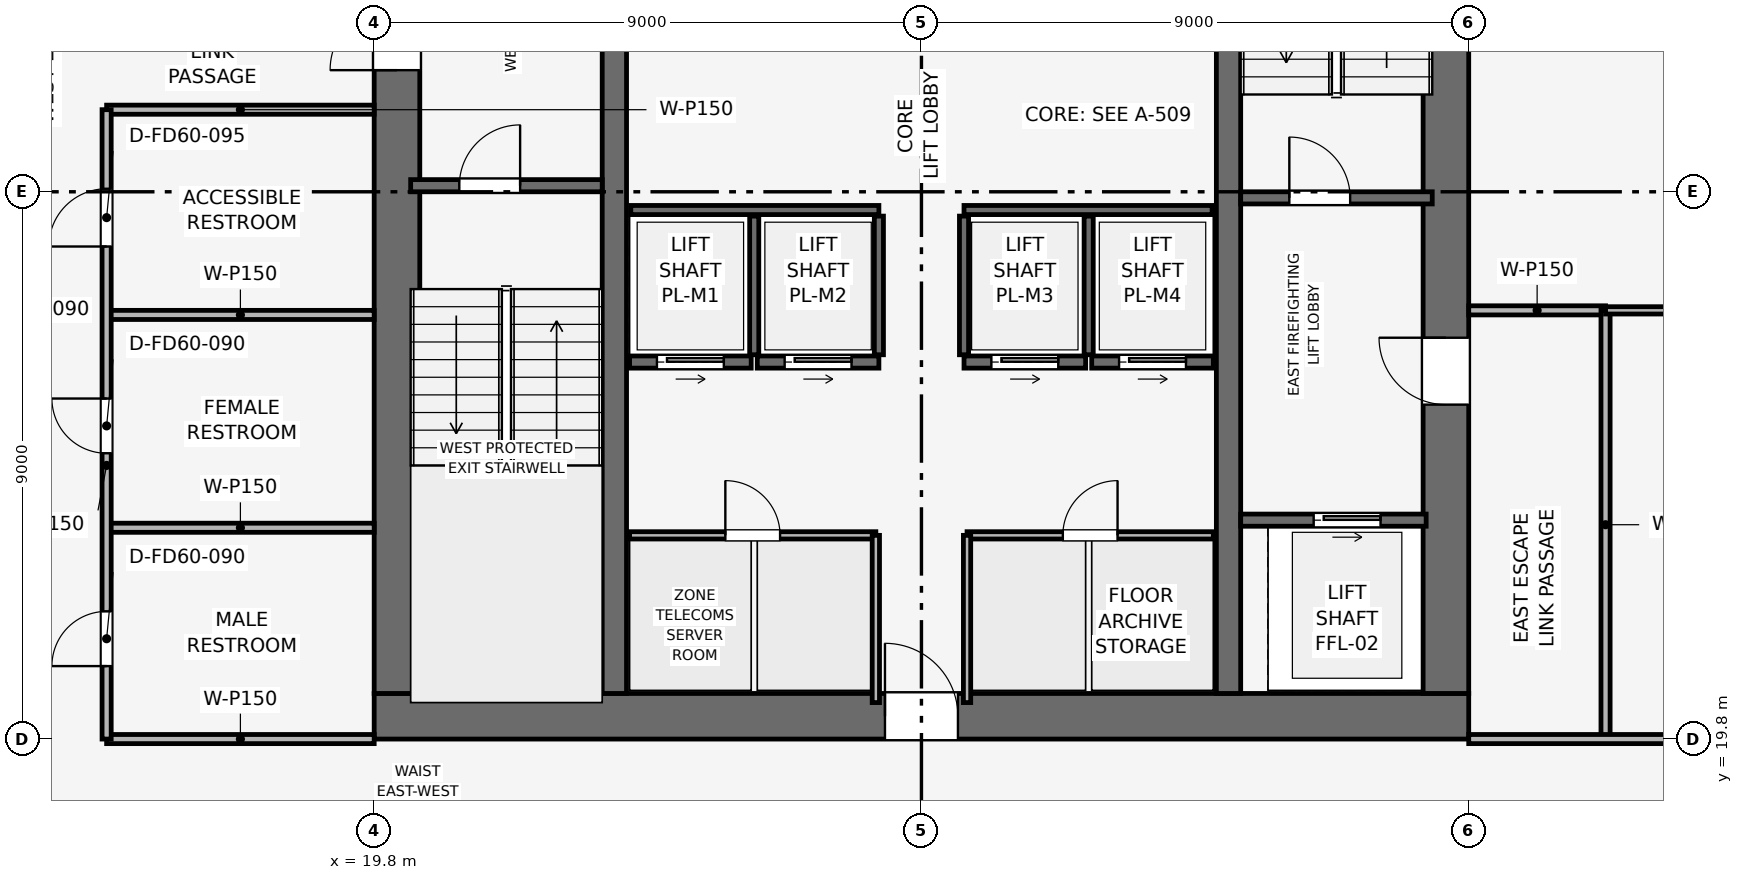
"""IFC4 building model, lengths in metres.
Left out: names, types, materials, properties, quantities, classifications, styles, units other than length and angle.
Written with IfcOpenShell. Run it as: python <this file> out.ifc"""

import sys

from ifc_helpers import new_model, si_unit, direction, frame, frame_2d, origin, place, context, subcontext, project, spatial, rectangle, extrude, element, fill, save


model = new_model("IFC4")
c1 = context("Model", 3, precision=1e-05, world=origin(), true_north=direction((0.0, 1.0)))
c2 = subcontext(c1, "Body", "Model", "MODEL_VIEW")
j1 = project(units=[si_unit("LENGTHUNIT", "METRE"), si_unit("PLANEANGLEUNIT", "RADIAN")], contexts=[c1])
p1 = place(None, origin())
s1 = spatial("IfcSite", under=j1, at=p1, CompositionType="ELEMENT")
p2 = place(p1, origin())
s2 = spatial("IfcBuilding", under=s1, at=p2, CompositionType="ELEMENT")
p3 = place(p2, frame((0.0, 0.0, 222.45)))
s3 = spatial("IfcBuildingStorey", under=s2, at=p3, CompositionType="ELEMENT", Elevation=222.45)
p4 = place(p3, frame((19.8, 20.175, 0.0), z_axis=(0.0, 0.0, 1.0), x_axis=(1.0, 0.0, 0.0)))
e1 = element("IfcWall", 1, at=p4, inside=s3, PredefinedType="SHEAR", context=c2, shape_type="SweptSolid", body=[
    extrude(rectangle(XDim=18.0, YDim=0.75, at=frame_2d((9.0, 0.0))), origin(), (0.0, 0.0, 1.0), 3.75),
])
p5 = place(p4, frame((8.4, 0.0, 0.0)))
e2 = element("IfcOpeningElement", 2, at=p5, cuts=e1, PredefinedType="OPENING", context=c2, shape_type="SweptSolid", body=[
    extrude(rectangle(XDim=1.2, YDim=2.2, at=frame_2d((0.6, 1.1))), frame((0.0, 0.385, 0.0), z_axis=(0.0, -1.0, 0.0), x_axis=(1.0, 0.0, 0.0)), (0.0, 0.0, 1.0), 0.77),
])
p6 = place(p3, frame((20.175, 20.55, 0.0), z_axis=(0.0, 0.0, 1.0), x_axis=(0.0, 1.0, 0.0)))
e3 = element("IfcWall", 3, at=p6, inside=s3, PredefinedType="SHEAR", context=c2, shape_type="SweptSolid", body=[
    extrude(rectangle(XDim=16.5, YDim=0.75, at=frame_2d((8.25, 0.0))), origin(), (0.0, 0.0, 1.0), 3.75),
])
p7 = place(p6, frame((10.25, 0.0, 0.0)))
e4 = element("IfcOpeningElement", 4, at=p7, cuts=e3, PredefinedType="OPENING", context=c2, shape_type="SweptSolid", body=[
    extrude(rectangle(XDim=1.1, YDim=2.15, at=frame_2d((0.55, 1.075))), frame((0.0, 0.385, 0.0), z_axis=(0.0, -1.0, 0.0), x_axis=(1.0, 0.0, 0.0)), (0.0, 0.0, 1.0), 0.77),
])
p8 = place(p3, frame((37.425, 20.55, 0.0), z_axis=(0.0, 0.0, 1.0), x_axis=(0.0, 1.0, 0.0)))
e5 = element("IfcWall", 5, at=p8, inside=s3, PredefinedType="SHEAR", context=c2, shape_type="SweptSolid", body=[
    extrude(rectangle(XDim=16.5, YDim=0.75, at=frame_2d((8.25, 0.0))), origin(), (0.0, 0.0, 1.0), 3.75),
])
p9 = place(p8, frame((4.75, 0.0, 0.0)))
e6 = element("IfcOpeningElement", 6, at=p9, cuts=e5, PredefinedType="OPENING", context=c2, shape_type="SweptSolid", body=[
    extrude(rectangle(XDim=1.1, YDim=2.15, at=frame_2d((0.55, 1.075))), frame((0.0, 0.385, 0.0), z_axis=(0.0, -1.0, 0.0), x_axis=(1.0, 0.0, 0.0)), (0.0, 0.0, 1.0), 0.77),
])
for number, where, z_axis, x_axis in (
    (7, (23.75, 20.55, 0.0), (0.0, 0.0, 1.0), (0.0, 1.0, 0.0)),
    (8, (33.85, 20.55, 0.0), (0.0, 0.0, 1.0), (0.0, 1.0, 0.0)),
):
    element("IfcWall", number, at=place(p3, frame(where, z_axis=z_axis, x_axis=x_axis)), inside=s3, PredefinedType="SHEAR", context=c2, shape_type="SweptSolid", body=[
        extrude(rectangle(XDim=16.5, YDim=0.4, at=frame_2d((8.25, 0.0))), origin(), (0.0, 0.0, 1.0), 3.75),
    ])
p10 = place(p3, frame((20.4, 28.9, 0.0), z_axis=(0.0, 0.0, 1.0), x_axis=(1.0, 0.0, 0.0)))
e9 = element("IfcWall", 9, at=p10, inside=s3, PredefinedType="SHEAR", context=c2, shape_type="SweptSolid", body=[
    extrude(rectangle(XDim=3.15, YDim=0.2, at=frame_2d((1.575, 0.0))), origin(), (0.0, 0.0, 1.0), 3.5),
])
p11 = place(p10, frame((0.8, 0.0, 0.0)))
e10 = element("IfcOpeningElement", 10, at=p11, cuts=e9, PredefinedType="OPENING", context=c2, shape_type="SweptSolid", body=[
    extrude(rectangle(XDim=1.0, YDim=2.1, at=frame_2d((0.5, 1.05))), frame((0.0, 0.11, 0.0), z_axis=(0.0, -1.0, 0.0), x_axis=(1.0, 0.0, 0.0)), (0.0, 0.0, 1.0), 0.22),
])
p12 = place(p3, frame((34.05, 28.7, 0.0), z_axis=(0.0, 0.0, 1.0), x_axis=(1.0, 0.0, 0.0)))
e11 = element("IfcWall", 11, at=p12, inside=s3, PredefinedType="SHEAR", context=c2, shape_type="SweptSolid", body=[
    extrude(rectangle(XDim=3.15, YDim=0.2, at=frame_2d((1.575, 0.0))), origin(), (0.0, 0.0, 1.0), 3.5),
])
p13 = place(p12, frame((0.8, 0.0, 0.0)))
e12 = element("IfcOpeningElement", 12, at=p13, cuts=e11, PredefinedType="OPENING", context=c2, shape_type="SweptSolid", body=[
    extrude(rectangle(XDim=1.0, YDim=2.1, at=frame_2d((0.5, 1.05))), frame((0.0, 0.11, 0.0), z_axis=(0.0, -1.0, 0.0), x_axis=(1.0, 0.0, 0.0)), (0.0, 0.0, 1.0), 0.22),
])
p14 = place(p3, frame((34.05, 23.4, 0.0), z_axis=(0.0, 0.0, 1.0), x_axis=(1.0, 0.0, 0.0)))
e13 = element("IfcWall", 13, at=p14, inside=s3, PredefinedType="SHEAR", context=c2, shape_type="SweptSolid", body=[
    extrude(rectangle(XDim=3.05, YDim=0.2, at=frame_2d((1.525, 0.0))), origin(), (0.0, 0.0, 1.0), 3.5),
])
p15 = place(p14, frame((1.2, 0.0, 0.0)))
e14 = element("IfcOpeningElement", 14, at=p15, cuts=e13, PredefinedType="OPENING", context=c2, shape_type="SweptSolid", body=[
    extrude(rectangle(XDim=1.1, YDim=2.15, at=frame_2d((0.55, 1.075))), frame((0.0, 0.11, 0.0), z_axis=(0.0, -1.0, 0.0), x_axis=(1.0, 0.0, 0.0)), (0.0, 0.0, 1.0), 0.22),
])
p16 = place(p3, frame((24.0, 26.0, 0.0), z_axis=(0.0, 0.0, 1.0), x_axis=(1.0, 0.0, 0.0)))
e15 = element("IfcWall", 15, at=p16, inside=s3, PredefinedType="SHEAR", context=c2, shape_type="SweptSolid", body=[
    extrude(rectangle(XDim=2.0, YDim=0.2, at=frame_2d((1.0, 0.0))), origin(), (0.0, 0.0, 1.0), 3.5),
])
p17 = place(p16, frame((0.45, 0.0, 0.0)))
e16 = element("IfcOpeningElement", 16, at=p17, cuts=e15, PredefinedType="OPENING", context=c2, shape_type="SweptSolid", body=[
    extrude(rectangle(XDim=1.1, YDim=2.15, at=frame_2d((0.55, 1.075))), frame((0.0, 0.11, 0.0), z_axis=(0.0, -1.0, 0.0), x_axis=(1.0, 0.0, 0.0)), (0.0, 0.0, 1.0), 0.22),
])
p18 = place(p3, frame((26.1, 26.0, 0.0), z_axis=(0.0, 0.0, 1.0), x_axis=(1.0, 0.0, 0.0)))
e17 = element("IfcWall", 17, at=p18, inside=s3, PredefinedType="SHEAR", context=c2, shape_type="SweptSolid", body=[
    extrude(rectangle(XDim=2.0, YDim=0.2, at=frame_2d((1.0, 0.0))), origin(), (0.0, 0.0, 1.0), 3.5),
])
p19 = place(p18, frame((0.45, 0.0, 0.0)))
e18 = element("IfcOpeningElement", 18, at=p19, cuts=e17, PredefinedType="OPENING", context=c2, shape_type="SweptSolid", body=[
    extrude(rectangle(XDim=1.1, YDim=2.15, at=frame_2d((0.55, 1.075))), frame((0.0, 0.11, 0.0), z_axis=(0.0, -1.0, 0.0), x_axis=(1.0, 0.0, 0.0)), (0.0, 0.0, 1.0), 0.22),
])
p20 = place(p3, frame((29.5, 26.0, 0.0), z_axis=(0.0, 0.0, 1.0), x_axis=(1.0, 0.0, 0.0)))
e19 = element("IfcWall", 19, at=p20, inside=s3, PredefinedType="SHEAR", context=c2, shape_type="SweptSolid", body=[
    extrude(rectangle(XDim=2.0, YDim=0.2, at=frame_2d((1.0, 0.0))), origin(), (0.0, 0.0, 1.0), 3.5),
])
p21 = place(p20, frame((0.45, 0.0, 0.0)))
e20 = element("IfcOpeningElement", 20, at=p21, cuts=e19, PredefinedType="OPENING", context=c2, shape_type="SweptSolid", body=[
    extrude(rectangle(XDim=1.1, YDim=2.15, at=frame_2d((0.55, 1.075))), frame((0.0, 0.11, 0.0), z_axis=(0.0, -1.0, 0.0), x_axis=(1.0, 0.0, 0.0)), (0.0, 0.0, 1.0), 0.22),
])
p22 = place(p3, frame((31.6, 26.0, 0.0), z_axis=(0.0, 0.0, 1.0), x_axis=(1.0, 0.0, 0.0)))
e21 = element("IfcWall", 21, at=p22, inside=s3, PredefinedType="SHEAR", context=c2, shape_type="SweptSolid", body=[
    extrude(rectangle(XDim=2.0, YDim=0.2, at=frame_2d((1.0, 0.0))), origin(), (0.0, 0.0, 1.0), 3.5),
])
p23 = place(p22, frame((0.45, 0.0, 0.0)))
e22 = element("IfcOpeningElement", 22, at=p23, cuts=e21, PredefinedType="OPENING", context=c2, shape_type="SweptSolid", body=[
    extrude(rectangle(XDim=1.1, YDim=2.15, at=frame_2d((0.55, 1.075))), frame((0.0, 0.11, 0.0), z_axis=(0.0, -1.0, 0.0), x_axis=(1.0, 0.0, 0.0)), (0.0, 0.0, 1.0), 0.22),
])
for number, where, z_axis, x_axis in (
    (23, (24.02, 28.5, 0.0), (0.0, 0.0, 1.0), (1.0, 0.0, 0.0)),
    (24, (29.5, 28.5, 0.0), (0.0, 0.0, 1.0), (1.0, 0.0, 0.0)),
):
    element("IfcWall", number, at=place(p3, frame(where, z_axis=z_axis, x_axis=x_axis)), inside=s3, PredefinedType="SHEAR", context=c2, shape_type="SweptSolid", body=[
        extrude(rectangle(XDim=4.08, YDim=0.15, at=frame_2d((2.04, 0.0))), origin(), (0.0, 0.0, 1.0), 3.5),
    ])
for number, where, z_axis, x_axis in (
    (25, (26.05, 26.12, 0.0), (0.0, 0.0, 1.0), (0.0, 1.0, 0.0)),
    (26, (28.1, 26.12, 0.0), (0.0, 0.0, 1.0), (0.0, 1.0, 0.0)),
    (27, (29.5, 26.12, 0.0), (0.0, 0.0, 1.0), (0.0, 1.0, 0.0)),
    (28, (31.55, 26.12, 0.0), (0.0, 0.0, 1.0), (0.0, 1.0, 0.0)),
):
    element("IfcWall", number, at=place(p3, frame(where, z_axis=z_axis, x_axis=x_axis)), inside=s3, PredefinedType="SHEAR", context=c2, shape_type="SweptSolid", body=[
        extrude(rectangle(XDim=2.28, YDim=0.15, at=frame_2d((1.14, 0.0))), origin(), (0.0, 0.0, 1.0), 3.5),
    ])
p24 = place(p3, frame((24.0, 23.15, 0.0), z_axis=(0.0, 0.0, 1.0), x_axis=(1.0, 0.0, 0.0)))
e29 = element("IfcWall", 29, at=p24, inside=s3, PredefinedType="PARTITIONING", context=c2, shape_type="SweptSolid", body=[
    extrude(rectangle(XDim=4.05, YDim=0.12, at=frame_2d((2.025, 0.0))), origin(), (0.0, 0.0, 1.0), 3.5),
])
p25 = place(p24, frame((1.575, 0.0, 0.0)))
e30 = element("IfcOpeningElement", 30, at=p25, cuts=e29, PredefinedType="OPENING", context=c2, shape_type="SweptSolid", body=[
    extrude(rectangle(XDim=0.9, YDim=2.1, at=frame_2d((0.45, 1.05))), frame((0.0, 0.07, 0.0), z_axis=(0.0, -1.0, 0.0), x_axis=(1.0, 0.0, 0.0)), (0.0, 0.0, 1.0), 0.14),
])
p26 = place(p3, frame((28.05, 20.4, 0.0), z_axis=(0.0, 0.0, 1.0), x_axis=(0.0, 1.0, 0.0)))
e31 = element("IfcWall", 31, at=p26, inside=s3, PredefinedType="PARTITIONING", context=c2, shape_type="SweptSolid", body=[
    extrude(rectangle(XDim=2.75, YDim=0.12, at=frame_2d((1.375, 0.0))), origin(), (0.0, 0.0, 1.0), 3.5),
])
p27 = place(p3, frame((29.55, 23.15, 0.0), z_axis=(0.0, 0.0, 1.0), x_axis=(1.0, 0.0, 0.0)))
e32 = element("IfcWall", 32, at=p27, inside=s3, PredefinedType="PARTITIONING", context=c2, shape_type="SweptSolid", body=[
    extrude(rectangle(XDim=4.05, YDim=0.12, at=frame_2d((2.025, 0.0))), origin(), (0.0, 0.0, 1.0), 3.5),
])
p28 = place(p27, frame((1.575, 0.0, 0.0)))
e33 = element("IfcOpeningElement", 33, at=p28, cuts=e32, PredefinedType="OPENING", context=c2, shape_type="SweptSolid", body=[
    extrude(rectangle(XDim=0.9, YDim=2.1, at=frame_2d((0.45, 1.05))), frame((0.0, 0.07, 0.0), z_axis=(0.0, -1.0, 0.0), x_axis=(1.0, 0.0, 0.0)), (0.0, 0.0, 1.0), 0.14),
])
p29 = place(p3, frame((29.55, 20.4, 0.0), z_axis=(0.0, 0.0, 1.0), x_axis=(0.0, 1.0, 0.0)))
e34 = element("IfcWall", 34, at=p29, inside=s3, PredefinedType="PARTITIONING", context=c2, shape_type="SweptSolid", body=[
    extrude(rectangle(XDim=2.75, YDim=0.12, at=frame_2d((1.375, 0.0))), origin(), (0.0, 0.0, 1.0), 3.5),
])
p30 = place(p3, frame((15.4, 19.8, 0.0), z_axis=(0.0, 0.0, 1.0), x_axis=(1.0, 0.0, 0.0)))
e35 = element("IfcWall", 35, at=p30, inside=s3, PredefinedType="PARTITIONING", context=c2, shape_type="SweptSolid", body=[
    extrude(rectangle(XDim=4.4, YDim=0.15, at=frame_2d((2.2, 0.0))), origin(), (0.0, 0.0, 1.0), 3.035),
])
for number, where, z_axis, x_axis in (
    (36, (15.4, 23.275, 0.0), (0.0, 0.0, 1.0), (1.0, 0.0, 0.0)),
    (37, (15.4, 26.775, 0.0), (0.0, 0.0, 1.0), (1.0, 0.0, 0.0)),
    (38, (15.4, 30.15, 0.0), (0.0, 0.0, 1.0), (1.0, 0.0, 0.0)),
):
    element("IfcWall", number, at=place(p3, frame(where, z_axis=z_axis, x_axis=x_axis)), inside=s3, PredefinedType="PARTITIONING", context=c2, shape_type="SweptSolid", body=[
        extrude(rectangle(XDim=4.4, YDim=0.15, at=frame_2d((2.2, 0.0))), origin(), (0.0, 0.0, 1.0), 3.5),
    ])
p31 = place(p3, frame((15.4, 19.8, 0.0), z_axis=(0.0, 0.0, 1.0), x_axis=(0.0, 1.0, 0.0)))
e39 = element("IfcWall", 39, at=p31, inside=s3, PredefinedType="PARTITIONING", context=c2, shape_type="SweptSolid", body=[
    extrude(rectangle(XDim=10.35, YDim=0.15, at=frame_2d((5.175, 0.0))), origin(), (0.0, 0.0, 1.0), 3.035),
])
p32 = place(p31, frame((1.2, 0.0, 0.0)))
e40 = element("IfcOpeningElement", 40, at=p32, cuts=e39, PredefinedType="OPENING", context=c2, shape_type="SweptSolid", body=[
    extrude(rectangle(XDim=0.9, YDim=2.1, at=frame_2d((0.45, 1.05))), frame((0.0, 0.085, 0.0), z_axis=(0.0, -1.0, 0.0), x_axis=(1.0, 0.0, 0.0)), (0.0, 0.0, 1.0), 0.17),
])
p33 = place(p31, frame((4.7, 0.0, 0.0)))
e41 = element("IfcOpeningElement", 41, at=p33, cuts=e39, PredefinedType="OPENING", context=c2, shape_type="SweptSolid", body=[
    extrude(rectangle(XDim=0.9, YDim=2.1, at=frame_2d((0.45, 1.05))), frame((0.0, 0.085, 0.0), z_axis=(0.0, -1.0, 0.0), x_axis=(1.0, 0.0, 0.0)), (0.0, 0.0, 1.0), 0.17),
])
p34 = place(p31, frame((8.1, 0.0, 0.0)))
e42 = element("IfcOpeningElement", 42, at=p34, cuts=e39, PredefinedType="OPENING", context=c2, shape_type="SweptSolid", body=[
    extrude(rectangle(XDim=0.95, YDim=2.1, at=frame_2d((0.475, 1.05))), frame((0.0, 0.085, 0.0), z_axis=(0.0, -1.0, 0.0), x_axis=(1.0, 0.0, 0.0)), (0.0, 0.0, 1.0), 0.17),
])
p35 = place(p3, frame((37.8, 26.85, 0.0), z_axis=(0.0, 0.0, 1.0), x_axis=(1.0, 0.0, 0.0)))
e43 = element("IfcWall", 43, at=p35, inside=s3, PredefinedType="PARTITIONING", context=c2, shape_type="SweptSolid", body=[
    extrude(rectangle(XDim=2.25, YDim=0.15, at=frame_2d((1.125, 0.0))), origin(), (0.0, 0.0, 1.0), 3.5),
])
p36 = place(p3, frame((40.05, 19.8, 0.0), z_axis=(0.0, 0.0, 1.0), x_axis=(0.0, 1.0, 0.0)))
e44 = element("IfcWall", 44, at=p36, inside=s3, PredefinedType="PARTITIONING", context=c2, shape_type="SweptSolid", body=[
    extrude(rectangle(XDim=7.05, YDim=0.15, at=frame_2d((3.525, 0.0))), origin(), (0.0, 0.0, 1.0), 3.035),
])
p37 = place(p3, frame((40.05, 26.85, 0.0), z_axis=(0.0, 0.0, 1.0), x_axis=(1.0, 0.0, 0.0)))
e45 = element("IfcWall", 45, at=p37, inside=s3, PredefinedType="PARTITIONING", context=c2, shape_type="SweptSolid", body=[
    extrude(rectangle(XDim=15.62, YDim=0.12, at=frame_2d((7.81, 0.0))), origin(), (0.0, 0.0, 1.0), 2.885),
])
p38 = place(p37, frame((7.36, 0.0, 0.0)))
e46 = element("IfcOpeningElement", 46, at=p38, cuts=e45, PredefinedType="OPENING", context=c2, shape_type="SweptSolid", body=[
    extrude(rectangle(XDim=0.9, YDim=2.1, at=frame_2d((0.45, 1.05))), frame((0.0, 0.07, 0.0), z_axis=(0.0, -1.0, 0.0), x_axis=(1.0, 0.0, 0.0)), (0.0, 0.0, 1.0), 0.14),
])
p39 = place(p3, frame((37.8, 19.8, 0.0), z_axis=(0.0, 0.0, 1.0), x_axis=(1.0, 0.0, 0.0)))
e47 = element("IfcWall", 47, at=p39, inside=s3, PredefinedType="PARTITIONING", context=c2, shape_type="SweptSolid", body=[
    extrude(rectangle(XDim=17.87, YDim=0.15, at=frame_2d((8.935, 0.0))), origin(), (0.0, 0.0, 1.0), 2.885),
])
p40 = place(p39, frame((4.4, 0.0, 0.0)))
e48 = element("IfcOpeningElement", 48, at=p40, cuts=e47, PredefinedType="OPENING", context=c2, shape_type="SweptSolid", body=[
    extrude(rectangle(XDim=0.9, YDim=2.1, at=frame_2d((0.45, 1.05))), frame((0.0, 0.085, 0.0), z_axis=(0.0, -1.0, 0.0), x_axis=(1.0, 0.0, 0.0)), (0.0, 0.0, 1.0), 0.17),
])
p41 = place(p11, origin())
e49 = element("IfcDoor", 49, at=p41, inside=s3, OperationType="SINGLE_SWING_RIGHT", PredefinedType="DOOR", context=c2, shape_type="SweptSolid", body=[
    extrude(rectangle(XDim=1.0, YDim=2.1, at=frame_2d((0.5, 1.05))), frame((0.0, 0.025, 0.0), z_axis=(0.0, -1.0, 0.0), x_axis=(1.0, 0.0, 0.0)), (0.0, 0.0, 1.0), 0.05),
])
fill(e10, e49)
p42 = place(p13, origin())
e50 = element("IfcDoor", 50, at=p42, inside=s3, OperationType="SINGLE_SWING_LEFT", PredefinedType="DOOR", context=c2, shape_type="SweptSolid", body=[
    extrude(rectangle(XDim=1.0, YDim=2.1, at=frame_2d((0.5, 1.05))), frame((0.0, 0.025, 0.0), z_axis=(0.0, -1.0, 0.0), x_axis=(1.0, 0.0, 0.0)), (0.0, 0.0, 1.0), 0.05),
])
fill(e12, e50)
p43 = place(p15, origin())
e51 = element("IfcDoor", 51, at=p43, inside=s3, OperationType="SLIDING_TO_RIGHT", PredefinedType="DOOR", context=c2, shape_type="SweptSolid", body=[
    extrude(rectangle(XDim=1.1, YDim=2.15, at=frame_2d((0.55, 1.075))), frame((0.0, 0.025, 0.0), z_axis=(0.0, -1.0, 0.0), x_axis=(1.0, 0.0, 0.0)), (0.0, 0.0, 1.0), 0.05),
])
fill(e14, e51)
p44 = place(p17, origin())
e52 = element("IfcDoor", 52, at=p44, inside=s3, OperationType="SLIDING_TO_RIGHT", PredefinedType="DOOR", context=c2, shape_type="SweptSolid", body=[
    extrude(rectangle(XDim=1.1, YDim=2.15, at=frame_2d((0.55, 1.075))), frame((0.0, 0.025, 0.0), z_axis=(0.0, -1.0, 0.0), x_axis=(1.0, 0.0, 0.0)), (0.0, 0.0, 1.0), 0.05),
])
fill(e16, e52)
p45 = place(p19, origin())
e53 = element("IfcDoor", 53, at=p45, inside=s3, OperationType="SLIDING_TO_RIGHT", PredefinedType="DOOR", context=c2, shape_type="SweptSolid", body=[
    extrude(rectangle(XDim=1.1, YDim=2.15, at=frame_2d((0.55, 1.075))), frame((0.0, 0.025, 0.0), z_axis=(0.0, -1.0, 0.0), x_axis=(1.0, 0.0, 0.0)), (0.0, 0.0, 1.0), 0.05),
])
fill(e18, e53)
p46 = place(p21, origin())
e54 = element("IfcDoor", 54, at=p46, inside=s3, OperationType="SLIDING_TO_RIGHT", PredefinedType="DOOR", context=c2, shape_type="SweptSolid", body=[
    extrude(rectangle(XDim=1.1, YDim=2.15, at=frame_2d((0.55, 1.075))), frame((0.0, 0.025, 0.0), z_axis=(0.0, -1.0, 0.0), x_axis=(1.0, 0.0, 0.0)), (0.0, 0.0, 1.0), 0.05),
])
fill(e20, e54)
p47 = place(p23, origin())
e55 = element("IfcDoor", 55, at=p47, inside=s3, OperationType="SLIDING_TO_RIGHT", PredefinedType="DOOR", context=c2, shape_type="SweptSolid", body=[
    extrude(rectangle(XDim=1.1, YDim=2.15, at=frame_2d((0.55, 1.075))), frame((0.0, 0.025, 0.0), z_axis=(0.0, -1.0, 0.0), x_axis=(1.0, 0.0, 0.0)), (0.0, 0.0, 1.0), 0.05),
])
fill(e22, e55)
p48 = place(p25, origin())
e56 = element("IfcDoor", 56, at=p48, inside=s3, OperationType="SINGLE_SWING_LEFT", PredefinedType="DOOR", context=c2, shape_type="SweptSolid", body=[
    extrude(rectangle(XDim=0.9, YDim=2.1, at=frame_2d((0.45, 1.05))), frame((0.0, 0.025, 0.0), z_axis=(0.0, -1.0, 0.0), x_axis=(1.0, 0.0, 0.0)), (0.0, 0.0, 1.0), 0.05),
])
fill(e30, e56)
p49 = place(p28, origin())
e57 = element("IfcDoor", 57, at=p49, inside=s3, OperationType="SINGLE_SWING_RIGHT", PredefinedType="DOOR", context=c2, shape_type="SweptSolid", body=[
    extrude(rectangle(XDim=0.9, YDim=2.1, at=frame_2d((0.45, 1.05))), frame((0.0, 0.025, 0.0), z_axis=(0.0, -1.0, 0.0), x_axis=(1.0, 0.0, 0.0)), (0.0, 0.0, 1.0), 0.05),
])
fill(e33, e57)
p50 = place(p32, origin())
e58 = element("IfcDoor", 58, at=p50, inside=s3, OperationType="SINGLE_SWING_LEFT", PredefinedType="DOOR", context=c2, shape_type="SweptSolid", body=[
    extrude(rectangle(XDim=0.9, YDim=2.1, at=frame_2d((0.45, 1.05))), frame((0.0, 0.025, 0.0), z_axis=(0.0, -1.0, 0.0), x_axis=(1.0, 0.0, 0.0)), (0.0, 0.0, 1.0), 0.05),
])
fill(e40, e58)
p51 = place(p33, origin())
e59 = element("IfcDoor", 59, at=p51, inside=s3, OperationType="SINGLE_SWING_RIGHT", PredefinedType="DOOR", context=c2, shape_type="SweptSolid", body=[
    extrude(rectangle(XDim=0.9, YDim=2.1, at=frame_2d((0.45, 1.05))), frame((0.0, 0.025, 0.0), z_axis=(0.0, -1.0, 0.0), x_axis=(1.0, 0.0, 0.0)), (0.0, 0.0, 1.0), 0.05),
])
fill(e41, e59)
p52 = place(p34, origin())
e60 = element("IfcDoor", 60, at=p52, inside=s3, OperationType="SINGLE_SWING_LEFT", PredefinedType="DOOR", context=c2, shape_type="SweptSolid", body=[
    extrude(rectangle(XDim=0.95, YDim=2.1, at=frame_2d((0.475, 1.05))), frame((0.0, 0.025, 0.0), z_axis=(0.0, -1.0, 0.0), x_axis=(1.0, 0.0, 0.0)), (0.0, 0.0, 1.0), 0.05),
])
fill(e42, e60)
p53 = place(p7, origin())
e61 = element("IfcDoor", 61, at=p53, inside=s3, OperationType="SINGLE_SWING_LEFT", PredefinedType="DOOR", context=c2, shape_type="SweptSolid", body=[
    extrude(rectangle(XDim=1.1, YDim=2.15, at=frame_2d((0.55, 1.075))), frame((0.0, 0.025, 0.0), z_axis=(0.0, -1.0, 0.0), x_axis=(1.0, 0.0, 0.0)), (0.0, 0.0, 1.0), 0.05),
])
fill(e4, e61)
p54 = place(p9, origin())
e62 = element("IfcDoor", 62, at=p54, inside=s3, OperationType="SINGLE_SWING_RIGHT", PredefinedType="DOOR", context=c2, shape_type="SweptSolid", body=[
    extrude(rectangle(XDim=1.1, YDim=2.15, at=frame_2d((0.55, 1.075))), frame((0.0, 0.025, 0.0), z_axis=(0.0, -1.0, 0.0), x_axis=(1.0, 0.0, 0.0)), (0.0, 0.0, 1.0), 0.05),
])
fill(e6, e62)
p55 = place(p5, origin())
e63 = element("IfcDoor", 63, at=p55, inside=s3, OperationType="SINGLE_SWING_LEFT", PredefinedType="DOOR", context=c2, shape_type="SweptSolid", body=[
    extrude(rectangle(XDim=1.2, YDim=2.2, at=frame_2d((0.6, 1.1))), frame((0.0, 0.025, 0.0), z_axis=(0.0, -1.0, 0.0), x_axis=(1.0, 0.0, 0.0)), (0.0, 0.0, 1.0), 0.05),
])
fill(e2, e63)
save(model, sys.argv[1])
